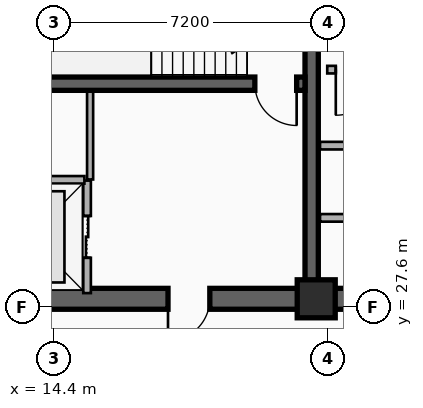
"""IFC4 building model, lengths in metres.
Left out: names, types, materials, properties, quantities, classifications, styles, units other than length and angle.
Written with IfcOpenShell. Run it as: python <this file> out.ifc"""

import sys

from ifc_helpers import new_model, si_unit, direction, frame, frame_2d, origin, origin_2d, place, context, subcontext, project, spatial, rectangle, extrude, element, fill, save


model = new_model("IFC4")
c1 = context("Model", 3, precision=1e-05, world=origin(), true_north=direction((0.0, 1.0)))
c2 = subcontext(c1, "Body", "Model", "MODEL_VIEW")
j1 = project(units=[si_unit("LENGTHUNIT", "METRE"), si_unit("PLANEANGLEUNIT", "RADIAN")], contexts=[c1])
p1 = place(None, origin())
s1 = spatial("IfcSite", under=j1, at=p1, CompositionType="ELEMENT")
p2 = place(p1, origin())
s2 = spatial("IfcBuilding", under=s1, at=p2, CompositionType="ELEMENT")
p3 = place(p2, frame((0.0, 0.0, 200.4)))
s3 = spatial("IfcBuildingStorey", under=s2, at=p3, CompositionType="ELEMENT", Elevation=200.4)
p4 = place(p3, frame((21.18, 27.82, 0.0), z_axis=(0.0, 0.0, 1.0), x_axis=(-1.0, 0.0, 0.0)))
e1 = element("IfcWall", 1, at=p4, inside=s3, PredefinedType="SHEAR", context=c2, shape_type="SweptSolid", body=[
    extrude(rectangle(XDim=9.03, YDim=0.55, at=frame_2d((4.515, 0.0))), origin(), (0.0, 0.0, 1.0), 3.6),
])
p5 = place(p4, frame((2.68, 0.0, 0.0)))
e2 = element("IfcOpeningElement", 2, at=p5, cuts=e1, PredefinedType="OPENING", context=c2, shape_type="SweptSolid", body=[
    extrude(rectangle(XDim=1.1, YDim=2.15, at=frame_2d((0.55, 1.075))), frame((0.0, 0.285, 0.0), z_axis=(0.0, -1.0, 0.0), x_axis=(1.0, 0.0, 0.0)), (0.0, 0.0, 1.0), 0.57),
])
p6 = place(p3, frame((33.15, 27.82, 0.0), z_axis=(0.0, 0.0, 1.0), x_axis=(-1.0, 0.0, 0.0)))
e3 = element("IfcWall", 3, at=p6, inside=s3, PredefinedType="SHEAR", context=c2, shape_type="SweptSolid", body=[
    extrude(rectangle(XDim=11.97, YDim=0.55, at=frame_2d((5.985, 0.0))), origin(), (0.0, 0.0, 1.0), 3.6),
])
p7 = place(p6, frame((6.1, 0.0, 0.0)))
e4 = element("IfcOpeningElement", 4, at=p7, cuts=e3, PredefinedType="OPENING", context=c2, shape_type="SweptSolid", body=[
    extrude(rectangle(XDim=1.6, YDim=2.2, at=frame_2d((0.8, 1.1))), frame((0.0, 0.285, 0.0), z_axis=(0.0, -1.0, 0.0), x_axis=(1.0, 0.0, 0.0)), (0.0, 0.0, 1.0), 0.57),
])
p8 = place(p3, frame((21.18, 28.095, 0.0), z_axis=(0.0, 0.0, 1.0), x_axis=(0.0, 1.0, 0.0)))
e5 = element("IfcWall", 5, at=p8, inside=s3, PredefinedType="SHEAR", context=c2, shape_type="SweptSolid", body=[
    extrude(rectangle(XDim=8.68, YDim=0.35, at=frame_2d((4.34, 0.0))), origin(), (0.0, 0.0, 1.0), 3.6),
])
p9 = place(p3, frame((21.005, 33.48, 0.0), z_axis=(0.0, 0.0, 1.0), x_axis=(-1.0, 0.0, 0.0)))
e6 = element("IfcWall", 6, at=p9, inside=s3, PredefinedType="SHEAR", context=c2, shape_type="SweptSolid", body=[
    extrude(rectangle(XDim=8.58, YDim=0.35, at=frame_2d((4.29, 0.0))), origin(), (0.0, 0.0, 1.0), 3.6),
])
p10 = place(p9, frame((0.22, 0.0, 0.0)))
e7 = element("IfcOpeningElement", 7, at=p10, cuts=e6, PredefinedType="OPENING", context=c2, shape_type="SweptSolid", body=[
    extrude(rectangle(XDim=1.1, YDim=2.15, at=frame_2d((0.55, 1.075))), frame((0.0, 0.185, 0.0), z_axis=(0.0, -1.0, 0.0), x_axis=(1.0, 0.0, 0.0)), (0.0, 0.0, 1.0), 0.37),
])
p11 = place(p3, frame((21.3, 27.82, 0.0), z_axis=(0.0, 0.0, 1.0), x_axis=(1.0, 0.0, 0.0)))
e8 = element("IfcColumn", 8, at=p11, inside=s3, PredefinedType="COLUMN", context=c2, shape_type="SweptSolid", body=[
    extrude(rectangle(XDim=1.0, YDim=1.0, at=origin_2d()), origin(), (0.0, 0.0, 1.0), 3.6),
])
p12 = place(p3, frame((15.27, 27.97, 0.0), z_axis=(0.0, 0.0, 1.0), x_axis=(0.0, 1.0, 0.0)))
e9 = element("IfcWall", 9, at=p12, inside=s3, PredefinedType="PARTITIONING", context=c2, shape_type="SweptSolid", body=[
    extrude(rectangle(XDim=2.96, YDim=0.2, at=frame_2d((1.48, 0.0))), origin(), (0.0, 0.0, 1.0), 2.41),
])
p13 = place(p12, frame((0.93, 0.0, 0.0)))
e10 = element("IfcOpeningElement", 10, at=p13, cuts=e9, PredefinedType="OPENING", context=c2, shape_type="SweptSolid", body=[
    extrude(rectangle(XDim=1.1, YDim=2.15, at=frame_2d((0.55, 1.075))), frame((0.0, 0.11, 0.0), z_axis=(0.0, -1.0, 0.0), x_axis=(1.0, 0.0, 0.0)), (0.0, 0.0, 1.0), 0.22),
])
p14 = place(p3, frame((12.45, 30.95, 0.0), z_axis=(0.0, 0.0, 1.0), x_axis=(1.0, 0.0, 0.0)))
e11 = element("IfcWall", 11, at=p14, inside=s3, PredefinedType="PARTITIONING", context=c2, shape_type="SweptSolid", body=[
    extrude(rectangle(XDim=2.75, YDim=0.2, at=frame_2d((1.375, 0.0))), origin(), (0.0, 0.0, 1.0), 2.41),
])
p15 = place(p3, frame((21.4, 31.85, 0.0), z_axis=(0.0, 0.0, 1.0), x_axis=(1.0, 0.0, 0.0)))
e12 = element("IfcWall", 12, at=p15, inside=s3, PredefinedType="PARTITIONING", context=c2, shape_type="SweptSolid", body=[
    extrude(rectangle(XDim=3.66, YDim=0.2, at=frame_2d((1.83, 0.0))), origin(), (0.0, 0.0, 1.0), 2.41),
])
p16 = place(p15, frame((1.23, 0.0, 0.0)))
e13 = element("IfcOpeningElement", 13, at=p16, cuts=e12, PredefinedType="OPENING", context=c2, shape_type="SweptSolid", body=[
    extrude(rectangle(XDim=1.2, YDim=2.15, at=frame_2d((0.6, 1.075))), frame((0.0, 0.11, 0.0), z_axis=(0.0, -1.0, 0.0), x_axis=(1.0, 0.0, 0.0)), (0.0, 0.0, 1.0), 0.22),
])
p17 = place(p3, frame((25.11, 33.85, 0.0), z_axis=(0.0, 0.0, 1.0), x_axis=(-1.0, 0.0, 0.0)))
e14 = element("IfcWall", 14, at=p17, inside=s3, PredefinedType="PARTITIONING", context=c2, shape_type="SweptSolid", body=[
    extrude(rectangle(XDim=3.52, YDim=0.2, at=frame_2d((1.76, 0.0))), origin(), (0.0, 0.0, 1.0), 2.41),
])
p18 = place(p17, frame((2.095, 0.0, 0.0)))
e15 = element("IfcOpeningElement", 15, at=p18, cuts=e14, PredefinedType="OPENING", context=c2, shape_type="SweptSolid", body=[
    extrude(rectangle(XDim=1.2, YDim=2.15, at=frame_2d((0.6, 1.075))), frame((0.0, 0.11, 0.0), z_axis=(0.0, -1.0, 0.0), x_axis=(1.0, 0.0, 0.0)), (0.0, 0.0, 1.0), 0.22),
])
p19 = place(p3, frame((21.4, 29.95, 0.0), z_axis=(0.0, 0.0, 1.0), x_axis=(1.0, 0.0, 0.0)))
e16 = element("IfcWall", 16, at=p19, inside=s3, PredefinedType="PARTITIONING", context=c2, shape_type="SweptSolid", body=[
    extrude(rectangle(XDim=3.66, YDim=0.2, at=frame_2d((1.83, 0.0))), origin(), (0.0, 0.0, 1.0), 2.41),
])
p20 = place(p3, frame((15.35, 30.96, 0.0), z_axis=(0.0, 0.0, 1.0), x_axis=(0.0, 1.0, 0.0)))
e17 = element("IfcWall", 17, at=p20, inside=s3, PredefinedType="PARTITIONING", context=c2, shape_type="SweptSolid", body=[
    extrude(rectangle(XDim=2.31, YDim=0.16, at=frame_2d((1.155, 0.0))), origin(), (0.0, 0.0, 1.0), 3.34),
])
p21 = place(p13, origin())
e18 = element("IfcDoor", 18, at=p21, inside=s3, OperationType="DOUBLE_DOOR_SLIDING", PredefinedType="DOOR", context=c2, shape_type="SweptSolid", body=[
    extrude(rectangle(XDim=1.1, YDim=2.15, at=frame_2d((0.55, 1.075))), frame((0.0, 0.025, 0.0), z_axis=(0.0, -1.0, 0.0), x_axis=(1.0, 0.0, 0.0)), (0.0, 0.0, 1.0), 0.05),
])
fill(e10, e18)
p22 = place(p10, origin())
e19 = element("IfcDoor", 19, at=p22, inside=s3, OperationType="SINGLE_SWING_LEFT", PredefinedType="DOOR", context=c2, shape_type="SweptSolid", body=[
    extrude(rectangle(XDim=1.1, YDim=2.15, at=frame_2d((0.55, 1.075))), frame((0.0, 0.025, 0.0), z_axis=(0.0, -1.0, 0.0), x_axis=(1.0, 0.0, 0.0)), (0.0, 0.0, 1.0), 0.05),
])
fill(e7, e19)
p23 = place(p5, origin())
e20 = element("IfcDoor", 20, at=p23, inside=s3, OperationType="SINGLE_SWING_RIGHT", PredefinedType="DOOR", context=c2, shape_type="SweptSolid", body=[
    extrude(rectangle(XDim=1.1, YDim=2.15, at=frame_2d((0.55, 1.075))), frame((0.0, 0.025, 0.0), z_axis=(0.0, -1.0, 0.0), x_axis=(1.0, 0.0, 0.0)), (0.0, 0.0, 1.0), 0.05),
])
fill(e2, e20)
p24 = place(p18, origin())
e21 = element("IfcDoor", 21, at=p24, inside=s3, OperationType="SINGLE_SWING_RIGHT", PredefinedType="DOOR", context=c2, shape_type="SweptSolid", body=[
    extrude(rectangle(XDim=1.2, YDim=2.15, at=frame_2d((0.6, 1.075))), frame((0.0, 0.025, 0.0), z_axis=(0.0, -1.0, 0.0), x_axis=(1.0, 0.0, 0.0)), (0.0, 0.0, 1.0), 0.05),
])
fill(e15, e21)
save(model, sys.argv[1])
